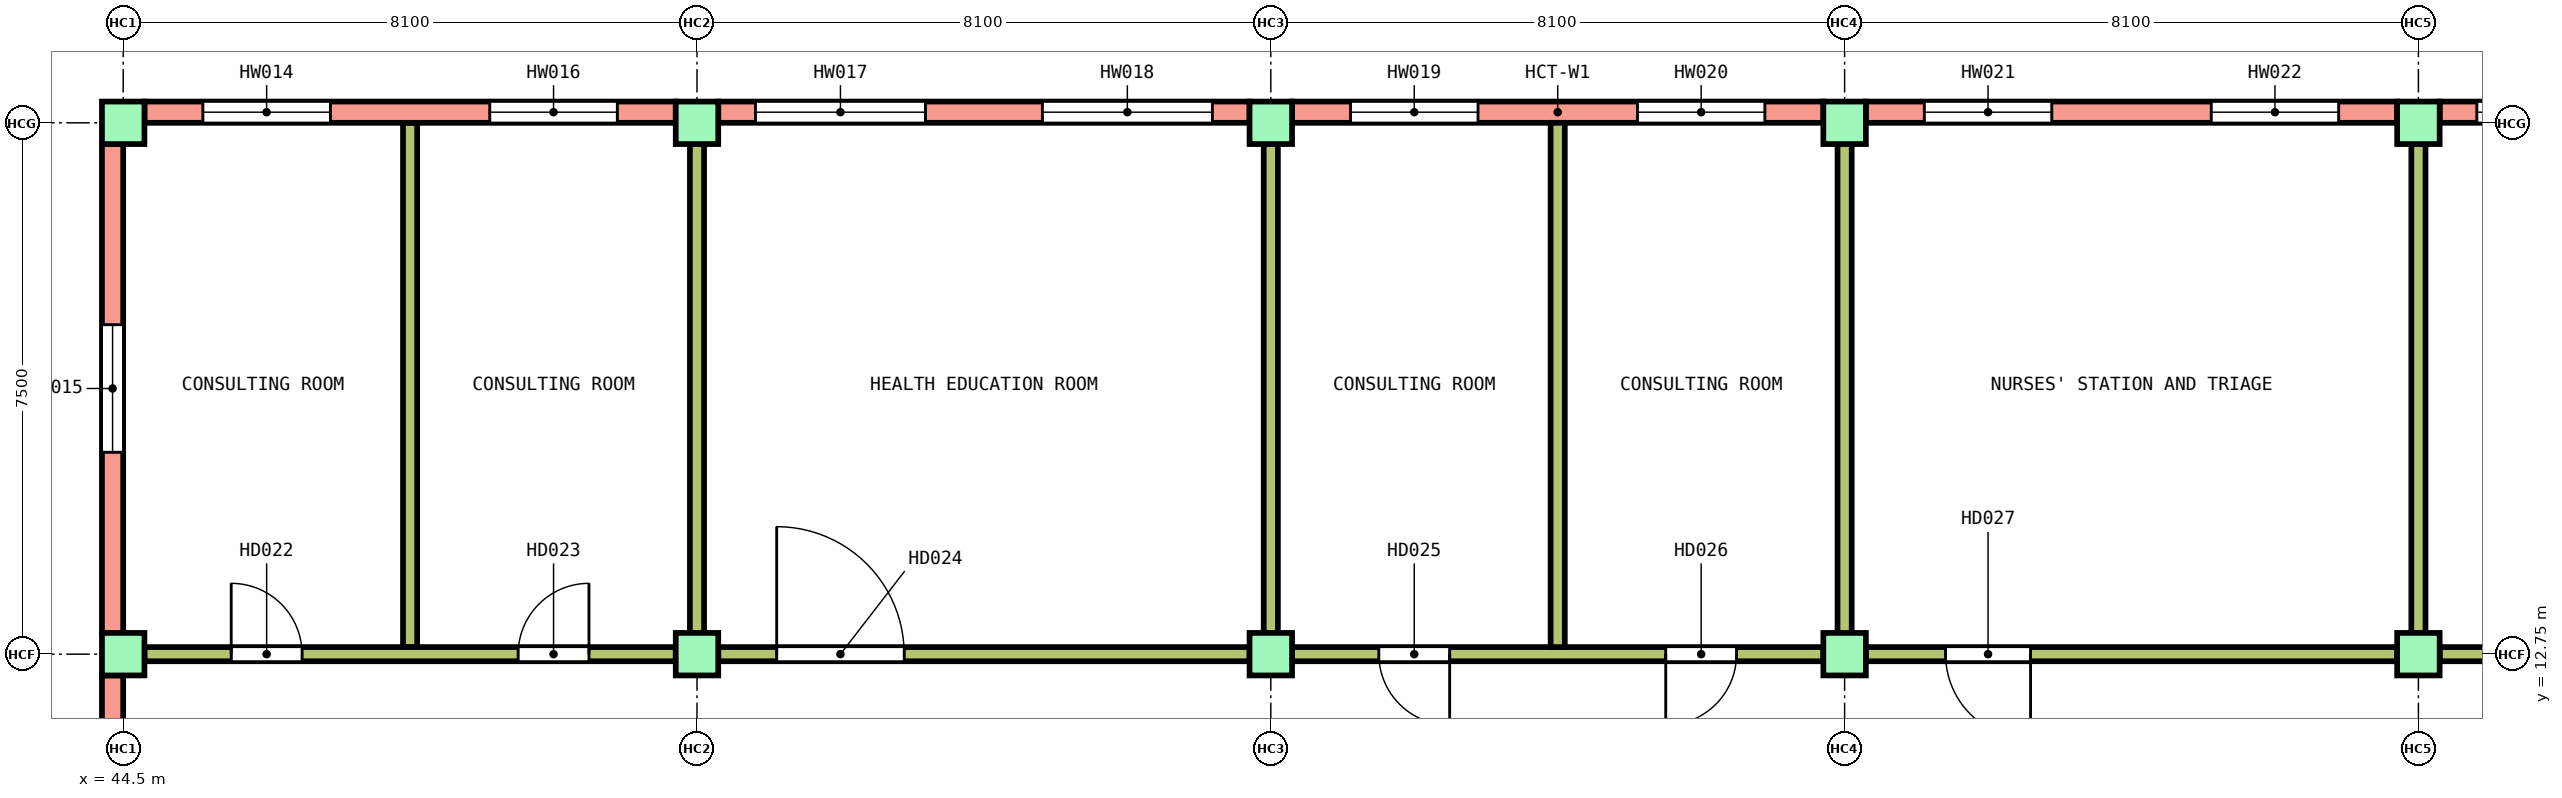
"""IFC4 building model, lengths in metres.
Left out: names, types, materials, properties, quantities, classifications, styles, units other than length and angle.
Written with IfcOpenShell. Run it as: python <this file> out.ifc"""

import sys

from ifc_helpers import new_model, si_unit, direction, frame, frame_2d, origin, origin_2d, place, context, subcontext, project, spatial, rectangle, extrude, element, fill, save


model = new_model("IFC4")
c1 = context("Model", 3, precision=1e-05, world=origin(), true_north=direction((0.0, 1.0)))
c2 = subcontext(c1, "Body", "Model", "MODEL_VIEW")
j1 = project(units=[si_unit("LENGTHUNIT", "METRE"), si_unit("PLANEANGLEUNIT", "RADIAN")], contexts=[c1])
p1 = place(None, origin())
s1 = spatial("IfcSite", under=j1, at=p1, CompositionType="ELEMENT")
p2 = place(p1, origin())
s2 = spatial("IfcBuilding", under=s1, at=p2, CompositionType="ELEMENT")
p3 = place(p2, origin())
s3 = spatial("IfcBuildingStorey", under=s2, at=p3, CompositionType="ELEMENT", Elevation=0.0)
for number, where, z_axis, x_axis in (
    (1, (44.5, 12.75, -0.25), (0.0, 0.0, 1.0), (1.0, 0.0, 0.0)),
    (2, (52.6, 12.75, -0.25), (0.0, 0.0, 1.0), (1.0, 0.0, 0.0)),
    (3, (60.7, 12.75, -0.25), (0.0, 0.0, 1.0), (1.0, 0.0, 0.0)),
    (4, (68.8, 12.75, -0.25), (0.0, 0.0, 1.0), (1.0, 0.0, 0.0)),
    (5, (76.9, 12.75, -0.25), (0.0, 0.0, 1.0), (1.0, 0.0, 0.0)),
    (6, (44.5, 20.25, -0.25), (0.0, 0.0, 1.0), (1.0, 0.0, 0.0)),
    (7, (52.6, 20.25, -0.25), (0.0, 0.0, 1.0), (1.0, 0.0, 0.0)),
    (8, (60.7, 20.25, -0.25), (0.0, 0.0, 1.0), (1.0, 0.0, 0.0)),
    (9, (68.8, 20.25, -0.25), (0.0, 0.0, 1.0), (1.0, 0.0, 0.0)),
    (10, (76.9, 20.25, -0.25), (0.0, 0.0, 1.0), (1.0, 0.0, 0.0)),
):
    element("IfcColumn", number, at=place(p3, frame(where, z_axis=z_axis, x_axis=x_axis)), inside=s3, PredefinedType="COLUMN", context=c2, shape_type="SweptSolid", body=[
        extrude(rectangle(XDim=0.6, YDim=0.6, at=origin_2d()), origin(), (0.0, 0.0, 1.0), 5.85),
    ])
p4 = place(p3, frame((44.35, 10.05, 0.0), z_axis=(0.0, 0.0, 1.0), x_axis=(0.0, 1.0, 0.0)))
e11 = element("IfcWall", 11, at=p4, inside=s3, PredefinedType="SOLIDWALL", context=c2, shape_type="SweptSolid", body=[
    extrude(rectangle(XDim=2.4, YDim=0.3, at=frame_2d((1.2, 0.0))), origin(), (0.0, 0.0, 1.0), 4.8),
])
p5 = place(p3, frame((44.35, 13.05, 0.0), z_axis=(0.0, 0.0, 1.0), x_axis=(0.0, 1.0, 0.0)))
e12 = element("IfcWall", 12, at=p5, inside=s3, PredefinedType="SOLIDWALL", context=c2, shape_type="SweptSolid", body=[
    extrude(rectangle(XDim=6.9, YDim=0.3, at=frame_2d((3.45, 0.0))), origin(), (0.0, 0.0, 1.0), 4.8),
])
p6 = place(p5, frame((2.55, 0.0, 0.9)))
e13 = element("IfcOpeningElement", 13, at=p6, cuts=e12, PredefinedType="OPENING", context=c2, shape_type="SweptSolid", body=[
    extrude(rectangle(XDim=1.8, YDim=1.8, at=frame_2d((0.9, 0.9))), frame((0.0, 0.16, 0.0), z_axis=(0.0, -1.0, 0.0), x_axis=(1.0, 0.0, 0.0)), (0.0, 0.0, 1.0), 0.32),
])
p7 = place(p3, frame((48.55, 12.85, 0.0), z_axis=(0.0, 0.0, 1.0), x_axis=(0.0, 1.0, 0.0)))
e14 = element("IfcWall", 14, at=p7, inside=s3, PredefinedType="PARTITIONING", context=c2, shape_type="SweptSolid", body=[
    extrude(rectangle(XDim=7.4, YDim=0.2, at=frame_2d((3.7, 0.0))), origin(), (0.0, 0.0, 1.0), 4.8),
])
for number, where, z_axis, x_axis in (
    (15, (60.7, 13.05, 0.0), (0.0, 0.0, 1.0), (0.0, 1.0, 0.0)),
    (16, (52.6, 13.05, 0.0), (0.0, 0.0, 1.0), (0.0, 1.0, 0.0)),
):
    element("IfcWall", number, at=place(p3, frame(where, z_axis=z_axis, x_axis=x_axis)), inside=s3, PredefinedType="PARTITIONING", context=c2, shape_type="SweptSolid", body=[
        extrude(rectangle(XDim=6.9, YDim=0.2, at=frame_2d((3.45, 0.0))), origin(), (0.0, 0.0, 1.0), 4.8),
    ])
p8 = place(p3, frame((68.8, 12.75, 0.0), z_axis=(0.0, 0.0, 1.0), x_axis=(0.0, 1.0, 0.0)))
e17 = element("IfcWall", 17, at=p8, inside=s3, PredefinedType="PARTITIONING", context=c2, shape_type="SweptSolid", body=[
    extrude(rectangle(XDim=7.5, YDim=0.2, at=frame_2d((3.75, 0.0))), origin(), (0.0, 0.0, 1.0), 4.8),
])
p9 = place(p3, frame((76.9, 13.05, 0.0), z_axis=(0.0, 0.0, 1.0), x_axis=(0.0, 1.0, 0.0)))
e18 = element("IfcWall", 18, at=p9, inside=s3, PredefinedType="PARTITIONING", context=c2, shape_type="SweptSolid", body=[
    extrude(rectangle(XDim=6.9, YDim=0.2, at=frame_2d((3.45, 0.0))), origin(), (0.0, 0.0, 1.0), 4.8),
])
p10 = place(p3, frame((44.8, 12.75, 0.0), z_axis=(0.0, 0.0, 1.0), x_axis=(1.0, 0.0, 0.0)))
e19 = element("IfcWall", 19, at=p10, inside=s3, PredefinedType="PARTITIONING", context=c2, shape_type="SweptSolid", body=[
    extrude(rectangle(XDim=7.5, YDim=0.2, at=frame_2d((3.75, 0.0))), origin(), (0.0, 0.0, 1.0), 4.8),
])
p11 = place(p10, frame((1.225, 0.0, 0.0)))
e20 = element("IfcOpeningElement", 20, at=p11, cuts=e19, PredefinedType="OPENING", context=c2, shape_type="SweptSolid", body=[
    extrude(rectangle(XDim=1.0, YDim=2.1, at=frame_2d((0.5, 1.05))), frame((0.0, 0.11, 0.0), z_axis=(0.0, -1.0, 0.0), x_axis=(1.0, 0.0, 0.0)), (0.0, 0.0, 1.0), 0.22),
])
p12 = place(p10, frame((5.275, 0.0, 0.0)))
e21 = element("IfcOpeningElement", 21, at=p12, cuts=e19, PredefinedType="OPENING", context=c2, shape_type="SweptSolid", body=[
    extrude(rectangle(XDim=1.0, YDim=2.1, at=frame_2d((0.5, 1.05))), frame((0.0, 0.11, 0.0), z_axis=(0.0, -1.0, 0.0), x_axis=(1.0, 0.0, 0.0)), (0.0, 0.0, 1.0), 0.22),
])
p13 = place(p3, frame((52.9, 12.75, 0.0), z_axis=(0.0, 0.0, 1.0), x_axis=(1.0, 0.0, 0.0)))
e22 = element("IfcWall", 22, at=p13, inside=s3, PredefinedType="PARTITIONING", context=c2, shape_type="SweptSolid", body=[
    extrude(rectangle(XDim=7.5, YDim=0.2, at=frame_2d((3.75, 0.0))), origin(), (0.0, 0.0, 1.0), 4.8),
])
p14 = place(p13, frame((0.825, 0.0, 0.0)))
e23 = element("IfcOpeningElement", 23, at=p14, cuts=e22, PredefinedType="OPENING", context=c2, shape_type="SweptSolid", body=[
    extrude(rectangle(XDim=1.8, YDim=2.1, at=frame_2d((0.9, 1.05))), frame((0.0, 0.11, 0.0), z_axis=(0.0, -1.0, 0.0), x_axis=(1.0, 0.0, 0.0)), (0.0, 0.0, 1.0), 0.22),
])
p15 = place(p3, frame((61.0, 12.75, 0.0), z_axis=(0.0, 0.0, 1.0), x_axis=(1.0, 0.0, 0.0)))
e24 = element("IfcWall", 24, at=p15, inside=s3, PredefinedType="PARTITIONING", context=c2, shape_type="SweptSolid", body=[
    extrude(rectangle(XDim=7.5, YDim=0.2, at=frame_2d((3.75, 0.0))), origin(), (0.0, 0.0, 1.0), 4.8),
])
p16 = place(p15, frame((1.225, 0.0, 0.0)))
e25 = element("IfcOpeningElement", 25, at=p16, cuts=e24, PredefinedType="OPENING", context=c2, shape_type="SweptSolid", body=[
    extrude(rectangle(XDim=1.0, YDim=2.1, at=frame_2d((0.5, 1.05))), frame((0.0, 0.11, 0.0), z_axis=(0.0, -1.0, 0.0), x_axis=(1.0, 0.0, 0.0)), (0.0, 0.0, 1.0), 0.22),
])
p17 = place(p15, frame((5.275, 0.0, 0.0)))
e26 = element("IfcOpeningElement", 26, at=p17, cuts=e24, PredefinedType="OPENING", context=c2, shape_type="SweptSolid", body=[
    extrude(rectangle(XDim=1.0, YDim=2.1, at=frame_2d((0.5, 1.05))), frame((0.0, 0.11, 0.0), z_axis=(0.0, -1.0, 0.0), x_axis=(1.0, 0.0, 0.0)), (0.0, 0.0, 1.0), 0.22),
])
p18 = place(p3, frame((69.1, 12.75, 0.0), z_axis=(0.0, 0.0, 1.0), x_axis=(1.0, 0.0, 0.0)))
e27 = element("IfcWall", 27, at=p18, inside=s3, PredefinedType="PARTITIONING", context=c2, shape_type="SweptSolid", body=[
    extrude(rectangle(XDim=7.5, YDim=0.2, at=frame_2d((3.75, 0.0))), origin(), (0.0, 0.0, 1.0), 4.8),
])
p19 = place(p18, frame((1.125, 0.0, 0.0)))
e28 = element("IfcOpeningElement", 28, at=p19, cuts=e27, PredefinedType="OPENING", context=c2, shape_type="SweptSolid", body=[
    extrude(rectangle(XDim=1.2, YDim=2.1, at=frame_2d((0.6, 1.05))), frame((0.0, 0.11, 0.0), z_axis=(0.0, -1.0, 0.0), x_axis=(1.0, 0.0, 0.0)), (0.0, 0.0, 1.0), 0.22),
])
p20 = place(p3, frame((77.2, 12.75, 0.0), z_axis=(0.0, 0.0, 1.0), x_axis=(1.0, 0.0, 0.0)))
e29 = element("IfcWall", 29, at=p20, inside=s3, PredefinedType="PARTITIONING", context=c2, shape_type="SweptSolid", body=[
    extrude(rectangle(XDim=7.5, YDim=0.2, at=frame_2d((3.75, 0.0))), origin(), (0.0, 0.0, 1.0), 4.8),
])
p21 = place(p20, frame((1.225, 0.0, 0.0)))
e30 = element("IfcOpeningElement", 30, at=p21, cuts=e29, PredefinedType="OPENING", context=c2, shape_type="SweptSolid", body=[
    extrude(rectangle(XDim=1.0, YDim=2.1, at=frame_2d((0.5, 1.05))), frame((0.0, 0.11, 0.0), z_axis=(0.0, -1.0, 0.0), x_axis=(1.0, 0.0, 0.0)), (0.0, 0.0, 1.0), 0.22),
])
p22 = place(p3, frame((44.8, 20.4, 0.0), z_axis=(0.0, 0.0, 1.0), x_axis=(1.0, 0.0, 0.0)))
e31 = element("IfcWall", 31, at=p22, inside=s3, PredefinedType="SOLIDWALL", context=c2, shape_type="SweptSolid", body=[
    extrude(rectangle(XDim=7.5, YDim=0.3, at=frame_2d((3.75, 0.0))), origin(), (0.0, 0.0, 1.0), 4.8),
])
p23 = place(p22, frame((0.825, 0.0, 0.9)))
e32 = element("IfcOpeningElement", 32, at=p23, cuts=e31, PredefinedType="OPENING", context=c2, shape_type="SweptSolid", body=[
    extrude(rectangle(XDim=1.8, YDim=1.8, at=frame_2d((0.9, 0.9))), frame((0.0, 0.16, 0.0), z_axis=(0.0, -1.0, 0.0), x_axis=(1.0, 0.0, 0.0)), (0.0, 0.0, 1.0), 0.32),
])
p24 = place(p22, frame((4.875, 0.0, 0.9)))
e33 = element("IfcOpeningElement", 33, at=p24, cuts=e31, PredefinedType="OPENING", context=c2, shape_type="SweptSolid", body=[
    extrude(rectangle(XDim=1.8, YDim=1.8, at=frame_2d((0.9, 0.9))), frame((0.0, 0.16, 0.0), z_axis=(0.0, -1.0, 0.0), x_axis=(1.0, 0.0, 0.0)), (0.0, 0.0, 1.0), 0.32),
])
p25 = place(p3, frame((52.9, 20.4, 0.0), z_axis=(0.0, 0.0, 1.0), x_axis=(1.0, 0.0, 0.0)))
e34 = element("IfcWall", 34, at=p25, inside=s3, PredefinedType="SOLIDWALL", context=c2, shape_type="SweptSolid", body=[
    extrude(rectangle(XDim=7.5, YDim=0.3, at=frame_2d((3.75, 0.0))), origin(), (0.0, 0.0, 1.0), 4.8),
])
p26 = place(p25, frame((0.525, 0.0, 0.3)))
e35 = element("IfcOpeningElement", 35, at=p26, cuts=e34, PredefinedType="OPENING", context=c2, shape_type="SweptSolid", body=[
    extrude(rectangle(XDim=2.4, YDim=2.4, at=frame_2d((1.2, 1.2))), frame((0.0, 0.16, 0.0), z_axis=(0.0, -1.0, 0.0), x_axis=(1.0, 0.0, 0.0)), (0.0, 0.0, 1.0), 0.32),
])
p27 = place(p25, frame((4.575, 0.0, 0.3)))
e36 = element("IfcOpeningElement", 36, at=p27, cuts=e34, PredefinedType="OPENING", context=c2, shape_type="SweptSolid", body=[
    extrude(rectangle(XDim=2.4, YDim=2.4, at=frame_2d((1.2, 1.2))), frame((0.0, 0.16, 0.0), z_axis=(0.0, -1.0, 0.0), x_axis=(1.0, 0.0, 0.0)), (0.0, 0.0, 1.0), 0.32),
])
p28 = place(p3, frame((61.0, 20.4, 0.0), z_axis=(0.0, 0.0, 1.0), x_axis=(1.0, 0.0, 0.0)))
e37 = element("IfcWall", 37, at=p28, inside=s3, PredefinedType="SOLIDWALL", context=c2, shape_type="SweptSolid", body=[
    extrude(rectangle(XDim=7.5, YDim=0.3, at=frame_2d((3.75, 0.0))), origin(), (0.0, 0.0, 1.0), 4.8),
])
p29 = place(p28, frame((0.825, 0.0, 0.9)))
e38 = element("IfcOpeningElement", 38, at=p29, cuts=e37, PredefinedType="OPENING", context=c2, shape_type="SweptSolid", body=[
    extrude(rectangle(XDim=1.8, YDim=1.8, at=frame_2d((0.9, 0.9))), frame((0.0, 0.16, 0.0), z_axis=(0.0, -1.0, 0.0), x_axis=(1.0, 0.0, 0.0)), (0.0, 0.0, 1.0), 0.32),
])
p30 = place(p28, frame((4.875, 0.0, 0.9)))
e39 = element("IfcOpeningElement", 39, at=p30, cuts=e37, PredefinedType="OPENING", context=c2, shape_type="SweptSolid", body=[
    extrude(rectangle(XDim=1.8, YDim=1.8, at=frame_2d((0.9, 0.9))), frame((0.0, 0.16, 0.0), z_axis=(0.0, -1.0, 0.0), x_axis=(1.0, 0.0, 0.0)), (0.0, 0.0, 1.0), 0.32),
])
p31 = place(p3, frame((69.1, 20.4, 0.0), z_axis=(0.0, 0.0, 1.0), x_axis=(1.0, 0.0, 0.0)))
e40 = element("IfcWall", 40, at=p31, inside=s3, PredefinedType="SOLIDWALL", context=c2, shape_type="SweptSolid", body=[
    extrude(rectangle(XDim=7.5, YDim=0.3, at=frame_2d((3.75, 0.0))), origin(), (0.0, 0.0, 1.0), 4.8),
])
p32 = place(p31, frame((0.825, 0.0, 0.9)))
e41 = element("IfcOpeningElement", 41, at=p32, cuts=e40, PredefinedType="OPENING", context=c2, shape_type="SweptSolid", body=[
    extrude(rectangle(XDim=1.8, YDim=1.8, at=frame_2d((0.9, 0.9))), frame((0.0, 0.16, 0.0), z_axis=(0.0, -1.0, 0.0), x_axis=(1.0, 0.0, 0.0)), (0.0, 0.0, 1.0), 0.32),
])
p33 = place(p31, frame((4.875, 0.0, 0.9)))
e42 = element("IfcOpeningElement", 42, at=p33, cuts=e40, PredefinedType="OPENING", context=c2, shape_type="SweptSolid", body=[
    extrude(rectangle(XDim=1.8, YDim=1.8, at=frame_2d((0.9, 0.9))), frame((0.0, 0.16, 0.0), z_axis=(0.0, -1.0, 0.0), x_axis=(1.0, 0.0, 0.0)), (0.0, 0.0, 1.0), 0.32),
])
p34 = place(p3, frame((77.2, 20.4, 0.0), z_axis=(0.0, 0.0, 1.0), x_axis=(1.0, 0.0, 0.0)))
e43 = element("IfcWall", 43, at=p34, inside=s3, PredefinedType="SOLIDWALL", context=c2, shape_type="SweptSolid", body=[
    extrude(rectangle(XDim=7.5, YDim=0.3, at=frame_2d((3.75, 0.0))), origin(), (0.0, 0.0, 1.0), 4.8),
])
p35 = place(p34, frame((0.525, 0.0, 0.3)))
e44 = element("IfcOpeningElement", 44, at=p35, cuts=e43, PredefinedType="OPENING", context=c2, shape_type="SweptSolid", body=[
    extrude(rectangle(XDim=2.4, YDim=2.4, at=frame_2d((1.2, 1.2))), frame((0.0, 0.16, 0.0), z_axis=(0.0, -1.0, 0.0), x_axis=(1.0, 0.0, 0.0)), (0.0, 0.0, 1.0), 0.32),
])
p36 = place(p34, frame((4.575, 0.0, 0.3)))
e45 = element("IfcOpeningElement", 45, at=p36, cuts=e43, PredefinedType="OPENING", context=c2, shape_type="SweptSolid", body=[
    extrude(rectangle(XDim=2.4, YDim=2.4, at=frame_2d((1.2, 1.2))), frame((0.0, 0.16, 0.0), z_axis=(0.0, -1.0, 0.0), x_axis=(1.0, 0.0, 0.0)), (0.0, 0.0, 1.0), 0.32),
])
p37 = place(p3, frame((64.75, 12.85, 0.0), z_axis=(0.0, 0.0, 1.0), x_axis=(0.0, 1.0, 0.0)))
e46 = element("IfcWall", 46, at=p37, inside=s3, PredefinedType="PARTITIONING", context=c2, shape_type="SweptSolid", body=[
    extrude(rectangle(XDim=7.4, YDim=0.2, at=frame_2d((3.7, 0.0))), origin(), (0.0, 0.0, 1.0), 4.8),
])
p38 = place(p11, origin())
e47 = element("IfcDoor", 47, at=p38, inside=s3, OperationType="SINGLE_SWING_LEFT", PredefinedType="DOOR", context=c2, shape_type="SweptSolid", body=[
    extrude(rectangle(XDim=1.0, YDim=2.1, at=frame_2d((0.5, 1.05))), frame((0.0, 0.025, 0.0), z_axis=(0.0, -1.0, 0.0), x_axis=(1.0, 0.0, 0.0)), (0.0, 0.0, 1.0), 0.05),
])
fill(e20, e47)
p39 = place(p12, origin())
e48 = element("IfcDoor", 48, at=p39, inside=s3, OperationType="SINGLE_SWING_RIGHT", PredefinedType="DOOR", context=c2, shape_type="SweptSolid", body=[
    extrude(rectangle(XDim=1.0, YDim=2.1, at=frame_2d((0.5, 1.05))), frame((0.0, 0.025, 0.0), z_axis=(0.0, -1.0, 0.0), x_axis=(1.0, 0.0, 0.0)), (0.0, 0.0, 1.0), 0.05),
])
fill(e21, e48)
p40 = place(p14, origin())
e49 = element("IfcDoor", 49, at=p40, inside=s3, OperationType="DOUBLE_DOOR_SINGLE_SWING", PredefinedType="DOOR", context=c2, shape_type="SweptSolid", body=[
    extrude(rectangle(XDim=1.8, YDim=2.1, at=frame_2d((0.9, 1.05))), frame((0.0, 0.025, 0.0), z_axis=(0.0, -1.0, 0.0), x_axis=(1.0, 0.0, 0.0)), (0.0, 0.0, 1.0), 0.05),
])
fill(e23, e49)
p41 = place(p16, origin())
e50 = element("IfcDoor", 50, at=p41, inside=s3, OperationType="SINGLE_SWING_RIGHT", PredefinedType="DOOR", context=c2, shape_type="SweptSolid", body=[
    extrude(rectangle(XDim=1.0, YDim=2.1, at=frame_2d((0.5, 1.05))), frame((0.0, 0.025, 0.0), z_axis=(0.0, -1.0, 0.0), x_axis=(1.0, 0.0, 0.0)), (0.0, 0.0, 1.0), 0.05),
])
fill(e25, e50)
p42 = place(p17, origin())
e51 = element("IfcDoor", 51, at=p42, inside=s3, OperationType="SINGLE_SWING_LEFT", PredefinedType="DOOR", context=c2, shape_type="SweptSolid", body=[
    extrude(rectangle(XDim=1.0, YDim=2.1, at=frame_2d((0.5, 1.05))), frame((0.0, 0.025, 0.0), z_axis=(0.0, -1.0, 0.0), x_axis=(1.0, 0.0, 0.0)), (0.0, 0.0, 1.0), 0.05),
])
fill(e26, e51)
p43 = place(p19, origin())
e52 = element("IfcDoor", 52, at=p43, inside=s3, OperationType="SINGLE_SWING_RIGHT", PredefinedType="DOOR", context=c2, shape_type="SweptSolid", body=[
    extrude(rectangle(XDim=1.2, YDim=2.1, at=frame_2d((0.6, 1.05))), frame((0.0, 0.025, 0.0), z_axis=(0.0, -1.0, 0.0), x_axis=(1.0, 0.0, 0.0)), (0.0, 0.0, 1.0), 0.05),
])
fill(e28, e52)
p44 = place(p23, origin())
e53 = element("IfcWindow", 53, at=p44, inside=s3, PartitioningType="SINGLE_PANEL", PredefinedType="WINDOW", context=c2, shape_type="SweptSolid", body=[
    extrude(rectangle(XDim=1.8, YDim=1.8, at=frame_2d((0.9, 0.9))), frame((0.0, 0.03, 0.0), z_axis=(0.0, -1.0, 0.0), x_axis=(1.0, 0.0, 0.0)), (0.0, 0.0, 1.0), 0.06),
])
fill(e32, e53)
p45 = place(p6, origin())
e54 = element("IfcWindow", 54, at=p45, inside=s3, PartitioningType="SINGLE_PANEL", PredefinedType="WINDOW", context=c2, shape_type="SweptSolid", body=[
    extrude(rectangle(XDim=1.8, YDim=1.8, at=frame_2d((0.9, 0.9))), frame((0.0, 0.03, 0.0), z_axis=(0.0, -1.0, 0.0), x_axis=(1.0, 0.0, 0.0)), (0.0, 0.0, 1.0), 0.06),
])
fill(e13, e54)
p46 = place(p24, origin())
e55 = element("IfcWindow", 55, at=p46, inside=s3, PartitioningType="SINGLE_PANEL", PredefinedType="WINDOW", context=c2, shape_type="SweptSolid", body=[
    extrude(rectangle(XDim=1.8, YDim=1.8, at=frame_2d((0.9, 0.9))), frame((0.0, 0.03, 0.0), z_axis=(0.0, -1.0, 0.0), x_axis=(1.0, 0.0, 0.0)), (0.0, 0.0, 1.0), 0.06),
])
fill(e33, e55)
p47 = place(p26, origin())
e56 = element("IfcWindow", 56, at=p47, inside=s3, PartitioningType="DOUBLE_PANEL_VERTICAL", PredefinedType="WINDOW", context=c2, shape_type="SweptSolid", body=[
    extrude(rectangle(XDim=2.4, YDim=2.4, at=frame_2d((1.2, 1.2))), frame((0.0, 0.03, 0.0), z_axis=(0.0, -1.0, 0.0), x_axis=(1.0, 0.0, 0.0)), (0.0, 0.0, 1.0), 0.06),
])
fill(e35, e56)
p48 = place(p27, origin())
e57 = element("IfcWindow", 57, at=p48, inside=s3, PartitioningType="DOUBLE_PANEL_VERTICAL", PredefinedType="WINDOW", context=c2, shape_type="SweptSolid", body=[
    extrude(rectangle(XDim=2.4, YDim=2.4, at=frame_2d((1.2, 1.2))), frame((0.0, 0.03, 0.0), z_axis=(0.0, -1.0, 0.0), x_axis=(1.0, 0.0, 0.0)), (0.0, 0.0, 1.0), 0.06),
])
fill(e36, e57)
p49 = place(p29, origin())
e58 = element("IfcWindow", 58, at=p49, inside=s3, PartitioningType="SINGLE_PANEL", PredefinedType="WINDOW", context=c2, shape_type="SweptSolid", body=[
    extrude(rectangle(XDim=1.8, YDim=1.8, at=frame_2d((0.9, 0.9))), frame((0.0, 0.03, 0.0), z_axis=(0.0, -1.0, 0.0), x_axis=(1.0, 0.0, 0.0)), (0.0, 0.0, 1.0), 0.06),
])
fill(e38, e58)
p50 = place(p30, origin())
e59 = element("IfcWindow", 59, at=p50, inside=s3, PartitioningType="SINGLE_PANEL", PredefinedType="WINDOW", context=c2, shape_type="SweptSolid", body=[
    extrude(rectangle(XDim=1.8, YDim=1.8, at=frame_2d((0.9, 0.9))), frame((0.0, 0.03, 0.0), z_axis=(0.0, -1.0, 0.0), x_axis=(1.0, 0.0, 0.0)), (0.0, 0.0, 1.0), 0.06),
])
fill(e39, e59)
p51 = place(p32, origin())
e60 = element("IfcWindow", 60, at=p51, inside=s3, PartitioningType="SINGLE_PANEL", PredefinedType="WINDOW", context=c2, shape_type="SweptSolid", body=[
    extrude(rectangle(XDim=1.8, YDim=1.8, at=frame_2d((0.9, 0.9))), frame((0.0, 0.03, 0.0), z_axis=(0.0, -1.0, 0.0), x_axis=(1.0, 0.0, 0.0)), (0.0, 0.0, 1.0), 0.06),
])
fill(e41, e60)
p52 = place(p33, origin())
e61 = element("IfcWindow", 61, at=p52, inside=s3, PartitioningType="SINGLE_PANEL", PredefinedType="WINDOW", context=c2, shape_type="SweptSolid", body=[
    extrude(rectangle(XDim=1.8, YDim=1.8, at=frame_2d((0.9, 0.9))), frame((0.0, 0.03, 0.0), z_axis=(0.0, -1.0, 0.0), x_axis=(1.0, 0.0, 0.0)), (0.0, 0.0, 1.0), 0.06),
])
fill(e42, e61)
p53 = place(p35, origin())
e62 = element("IfcWindow", 62, at=p53, inside=s3, PartitioningType="DOUBLE_PANEL_VERTICAL", PredefinedType="WINDOW", context=c2, shape_type="SweptSolid", body=[
    extrude(rectangle(XDim=2.4, YDim=2.4, at=frame_2d((1.2, 1.2))), frame((0.0, 0.03, 0.0), z_axis=(0.0, -1.0, 0.0), x_axis=(1.0, 0.0, 0.0)), (0.0, 0.0, 1.0), 0.06),
])
fill(e44, e62)
save(model, sys.argv[1])
